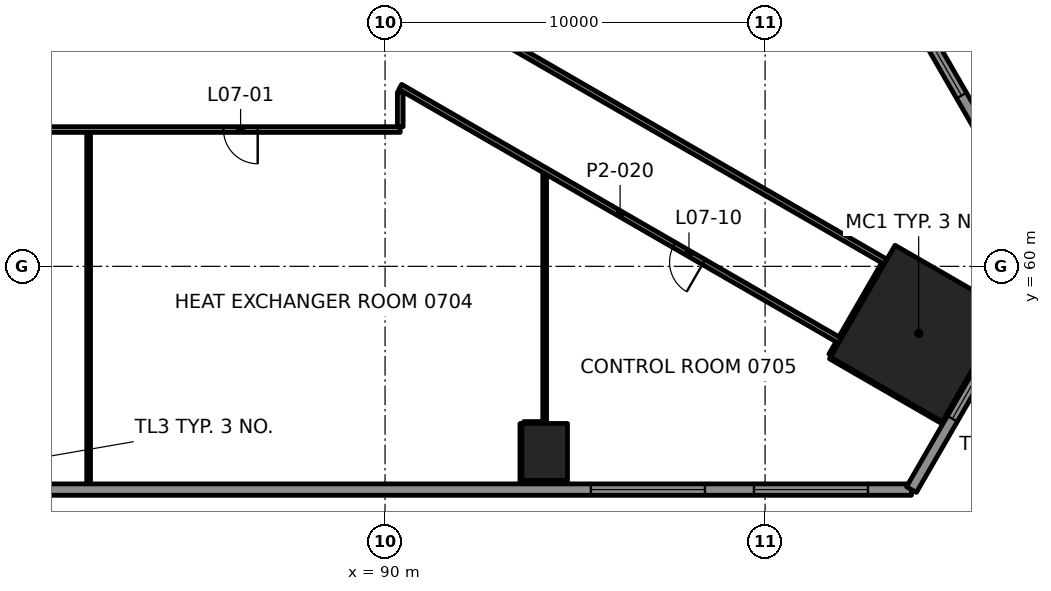
"""IFC4 building model, lengths in metres.
Left out: names, types, materials, properties, quantities, classifications, styles, units other than length and angle.
Written with IfcOpenShell. Run it as: python <this file> out.ifc"""

import sys

from ifc_helpers import new_model, si_unit, direction, frame, frame_2d, origin, origin_2d, place, context, subcontext, project, spatial, rectangle, extrude, element, fill, save


model = new_model("IFC4")
c1 = context("Model", 3, precision=1e-05, world=origin(), true_north=direction((0.0, 1.0)))
c2 = subcontext(c1, "Body", "Model", "MODEL_VIEW")
j1 = project(units=[si_unit("LENGTHUNIT", "METRE"), si_unit("PLANEANGLEUNIT", "RADIAN")], contexts=[c1])
p1 = place(None, origin())
s1 = spatial("IfcSite", under=j1, at=p1, CompositionType="ELEMENT")
p2 = place(p1, origin())
s2 = spatial("IfcBuilding", under=s1, at=p2, CompositionType="ELEMENT")
p3 = place(p2, frame((0.0, 0.0, 35.5)))
s3 = spatial("IfcBuildingStorey", under=s2, at=p3, CompositionType="ELEMENT", Elevation=35.5)
p4 = place(p3, frame((104.041, 58.233, 0.0), z_axis=(0.0, 0.0, 1.0), x_axis=(0.5, 0.866025403784, 0.0)))
e1 = element("IfcColumn", 1, at=p4, inside=s3, PredefinedType="COLUMN", context=c2, shape_type="SweptSolid", body=[
    extrude(rectangle(XDim=3.4, YDim=3.4, at=origin_2d()), origin(), (0.0, 0.0, 1.0), 4.5),
])
p5 = place(p3, frame((94.2, 55.115, -0.0), z_axis=(0.0, 0.0, 1.0), x_axis=(1.0, 0.0, 0.0)))
e2 = element("IfcColumn", 2, at=p5, inside=s3, PredefinedType="COLUMN", context=c2, shape_type="SweptSolid", body=[
    extrude(rectangle(XDim=1.2, YDim=1.5, at=origin_2d()), origin(), (0.0, 0.0, 1.0), 4.5),
])
p6 = place(p3, frame((93.65, 55.865, 0.0), z_axis=(0.0, 0.0, 1.0), x_axis=(1.0, 0.0, 0.0)))
e3 = element("IfcWall", 3, at=p6, inside=s3, PredefinedType="PARTITIONING", context=c2, shape_type="SweptSolid", body=[
    extrude(rectangle(XDim=0.499, YDim=0.1, at=frame_2d((0.25, 0.0))), origin(), (0.0, 0.0, 1.0), 3.7),
])
p7 = place(p3, frame((90.4, 63.6, 0.0), z_axis=(0.0, 0.0, 1.0), x_axis=(-1.0, 0.0, 0.0)))
e4 = element("IfcWall", 4, at=p7, inside=s3, PredefinedType="PARTITIONING", context=c2, shape_type="SweptSolid", body=[
    extrude(rectangle(XDim=30.799, YDim=0.15, at=frame_2d((15.4, 0.0))), origin(), (0.0, 0.0, 1.0), 3.7),
])
p8 = place(p7, frame((3.751, 0.0, 0.0)))
e5 = element("IfcOpeningElement", 5, at=p8, cuts=e4, PredefinedType="OPENING", context=c2, shape_type="SweptSolid", body=[
    extrude(rectangle(XDim=0.9, YDim=2.1, at=frame_2d((0.45, 1.05))), frame((0.0, 0.085, 0.0), z_axis=(0.0, -1.0, 0.0), x_axis=(1.0, 0.0, 0.0)), (0.0, 0.0, 1.0), 0.17),
])
p9 = place(p7, frame((14.8, 0.0, 0.0)))
e6 = element("IfcOpeningElement", 6, at=p9, cuts=e4, PredefinedType="OPENING", context=c2, shape_type="SweptSolid", body=[
    extrude(rectangle(XDim=1.2, YDim=2.1, at=frame_2d((0.6, 1.05))), frame((0.0, 0.085, 0.0), z_axis=(0.0, -1.0, 0.0), x_axis=(1.0, 0.0, 0.0)), (0.0, 0.0, 1.0), 0.17),
])
p10 = place(p7, frame((25.998, 0.0, 0.0)))
e7 = element("IfcOpeningElement", 7, at=p10, cuts=e4, PredefinedType="OPENING", context=c2, shape_type="SweptSolid", body=[
    extrude(rectangle(XDim=1.2, YDim=2.1, at=frame_2d((0.6, 1.05))), frame((0.0, 0.085, 0.0), z_axis=(0.0, -1.0, 0.0), x_axis=(1.0, 0.0, 0.0)), (0.0, 0.0, 1.0), 0.17),
])
p11 = place(p3, frame((101.744, 57.655, 0.0), z_axis=(0.0, 0.0, 1.0), x_axis=(0.500136362069, 0.865946660792, 0.0)))
e8 = element("IfcWall", 8, at=p11, inside=s3, PredefinedType="PARTITIONING", context=c2, shape_type="SweptSolid", body=[
    extrude(rectangle(XDim=0.375, YDim=0.15, at=frame_2d((0.187, 0.0))), origin(), (0.0, 0.0, 1.0), 3.7),
])
p12 = place(p3, frame((94.2, 55.866, 0.0), z_axis=(0.0, 0.0, 1.0), x_axis=(0.0, 1.0, 0.0)))
e9 = element("IfcWall", 9, at=p12, inside=s3, PredefinedType="PARTITIONING", context=c2, shape_type="SweptSolid", body=[
    extrude(rectangle(XDim=6.547, YDim=0.1, at=frame_2d((3.273, 0.0))), origin(), (0.0, 0.0, 1.0), 3.7),
])
p13 = place(p3, frame((93.6, 54.155, 0.0), z_axis=(0.0, 0.0, 1.0), x_axis=(0.0, 1.0, 0.0)))
e10 = element("IfcWall", 10, at=p13, inside=s3, PredefinedType="PARTITIONING", context=c2, shape_type="SweptSolid", body=[
    extrude(rectangle(XDim=1.71, YDim=0.1, at=frame_2d((0.855, 0.0))), origin(), (0.0, 0.0, 1.0), 3.7),
])
p14 = place(p3, frame((90.4, 63.675, 0.0), z_axis=(0.0, 0.0, 1.0), x_axis=(0.0, 1.0, 0.0)))
e11 = element("IfcWall", 11, at=p14, inside=s3, PredefinedType="PARTITIONING", context=c2, shape_type="SweptSolid", body=[
    extrude(rectangle(XDim=0.912, YDim=0.15, at=frame_2d((0.456, 0.0))), origin(), (0.0, 0.0, 1.0), 3.7),
])
p15 = place(p3, frame((82.2, 54.155, 0.0), z_axis=(0.0, 0.0, 1.0), x_axis=(0.0, 1.0, 0.0)))
e12 = element("IfcWall", 12, at=p15, inside=s3, PredefinedType="PARTITIONING", context=c2, shape_type="SweptSolid", body=[
    extrude(rectangle(XDim=9.37, YDim=0.1, at=frame_2d((4.685, 0.0))), origin(), (0.0, 0.0, 1.0), 3.7),
])
p16 = place(p3, frame((103.168, 60.123, 0.0), z_axis=(0.0, 0.0, 1.0), x_axis=(-0.866022484069, 0.500005057062, 0.0)))
e13 = element("IfcWall", 13, at=p16, inside=s3, PredefinedType="PARTITIONING", context=c2, shape_type="SweptSolid", body=[
    extrude(rectangle(XDim=14.657, YDim=0.15, at=frame_2d((7.329, 0.0))), origin(), (0.0, 0.0, 1.0), 3.7),
])
p17 = place(p3, frame((101.969, 58.044, 0.0), z_axis=(0.0, 0.0, 1.0), x_axis=(-0.866027935033, 0.499995615723, 0.0)))
e14 = element("IfcWall", 14, at=p17, inside=s3, PredefinedType="PARTITIONING", context=c2, shape_type="SweptSolid", body=[
    extrude(rectangle(XDim=13.358, YDim=0.15, at=frame_2d((6.679, 0.0))), origin(), (0.0, 0.0, 1.0), 3.547),
])
p18 = place(p17, frame((4.137, 0.0, 0.0)))
e15 = element("IfcOpeningElement", 15, at=p18, cuts=e14, PredefinedType="OPENING", context=c2, shape_type="SweptSolid", body=[
    extrude(rectangle(XDim=0.9, YDim=2.1, at=frame_2d((0.45, 1.05))), frame((0.0, 0.085, 0.0), z_axis=(0.0, -1.0, 0.0), x_axis=(1.0, 0.0, 0.0)), (0.0, 0.0, 1.0), 0.17),
])
p19 = place(p3, frame((104.802, 55.831, 0.0), z_axis=(0.0, 0.0, 1.0), x_axis=(-0.866014251095, 0.500019316528, 0.0)))
e16 = element("IfcWall", 16, at=p19, inside=s3, PredefinedType="PARTITIONING", context=c2, shape_type="SweptSolid", body=[
    extrude(rectangle(XDim=3.559, YDim=0.1, at=frame_2d((1.78, 0.0))), origin(), (0.0, 0.0, 1.0), 3.7),
])
p20 = place(p3, frame((102.007, 58.109, 0.0), z_axis=(0.0, 0.0, 1.0), x_axis=(0.499979232204, 0.866037393745, 0.0)))
e17 = element("IfcWall", 17, at=p20, inside=s3, PredefinedType="PARTITIONING", context=c2, shape_type="SweptSolid", body=[
    extrude(rectangle(XDim=2.25, YDim=0.15, at=frame_2d((1.125, 0.0))), origin(), (0.0, 0.0, 1.0), 3.547),
])
p21 = place(p3, frame((46.148, 54.125, 0.0), z_axis=(0.0, 0.0, 1.0), x_axis=(1.0, 0.0, 0.0)))
e18 = element("IfcWall", 18, at=p21, inside=s3, PredefinedType="SOLIDWALL", context=c2, shape_type="SweptSolid", body=[
    extrude(rectangle(XDim=57.704, YDim=0.3, at=frame_2d((28.852, 0.0))), origin(), (0.0, 0.0, 1.0), 4.3),
])
p22 = place(p21, frame((1.145, 0.0, 0.8)))
e19 = element("IfcOpeningElement", 19, at=p22, cuts=e18, PredefinedType="OPENING", context=c2, shape_type="SweptSolid", body=[
    extrude(rectangle(XDim=3.0, YDim=2.4, at=frame_2d((1.5, 1.2))), frame((0.0, 0.16, 0.0), z_axis=(0.0, -1.0, 0.0), x_axis=(1.0, 0.0, 0.0)), (0.0, 0.0, 1.0), 0.32),
])
p23 = place(p21, frame((5.435, 0.0, 0.8)))
e20 = element("IfcOpeningElement", 20, at=p23, cuts=e18, PredefinedType="OPENING", context=c2, shape_type="SweptSolid", body=[
    extrude(rectangle(XDim=3.0, YDim=2.4, at=frame_2d((1.5, 1.2))), frame((0.0, 0.16, 0.0), z_axis=(0.0, -1.0, 0.0), x_axis=(1.0, 0.0, 0.0)), (0.0, 0.0, 1.0), 0.32),
])
p24 = place(p21, frame((49.269, 0.0, 0.8)))
e21 = element("IfcOpeningElement", 21, at=p24, cuts=e18, PredefinedType="OPENING", context=c2, shape_type="SweptSolid", body=[
    extrude(rectangle(XDim=3.0, YDim=2.4, at=frame_2d((1.5, 1.2))), frame((0.0, 0.16, 0.0), z_axis=(0.0, -1.0, 0.0), x_axis=(1.0, 0.0, 0.0)), (0.0, 0.0, 1.0), 0.32),
])
p25 = place(p21, frame((53.559, 0.0, 0.8)))
e22 = element("IfcOpeningElement", 22, at=p25, cuts=e18, PredefinedType="OPENING", context=c2, shape_type="SweptSolid", body=[
    extrude(rectangle(XDim=3.0, YDim=2.4, at=frame_2d((1.5, 1.2))), frame((0.0, 0.16, 0.0), z_axis=(0.0, -1.0, 0.0), x_axis=(1.0, 0.0, 0.0)), (0.0, 0.0, 1.0), 0.32),
])
p26 = place(p3, frame((103.852, 54.125, 0.0), z_axis=(0.0, 0.0, 1.0), x_axis=(0.500000231294, 0.866025270247, 0.0)))
e23 = element("IfcWall", 23, at=p26, inside=s3, PredefinedType="SOLIDWALL", context=c2, shape_type="SweptSolid", body=[
    extrude(rectangle(XDim=7.304, YDim=0.3, at=frame_2d((3.652, 0.0))), origin(), (0.0, 0.0, 1.0), 4.3),
])
p27 = place(p26, frame((2.152, 0.0, 0.8)))
e24 = element("IfcOpeningElement", 24, at=p27, cuts=e23, PredefinedType="OPENING", context=c2, shape_type="SweptSolid", body=[
    extrude(rectangle(XDim=3.0, YDim=2.4, at=frame_2d((1.5, 1.2))), frame((0.0, 0.16, 0.0), z_axis=(0.0, -1.0, 0.0), x_axis=(1.0, 0.0, 0.0)), (0.0, 0.0, 1.0), 0.32),
])
p28 = place(p3, frame((107.504, 60.451, 0.0), z_axis=(0.0, 0.0, 1.0), x_axis=(-0.500000550228, 0.86602508611, 0.0)))
e25 = element("IfcWall", 25, at=p28, inside=s3, PredefinedType="SOLIDWALL", context=c2, shape_type="SweptSolid", body=[
    extrude(rectangle(XDim=57.704, YDim=0.3, at=frame_2d((28.852, 0.0))), origin(), (0.0, 0.0, 1.0), 4.3),
])
p29 = place(p28, frame((0.89, 0.0, 0.8)))
e26 = element("IfcOpeningElement", 26, at=p29, cuts=e25, PredefinedType="OPENING", context=c2, shape_type="SweptSolid", body=[
    extrude(rectangle(XDim=3.0, YDim=2.4, at=frame_2d((1.5, 1.2))), frame((0.0, 0.16, 0.0), z_axis=(0.0, -1.0, 0.0), x_axis=(1.0, 0.0, 0.0)), (0.0, 0.0, 1.0), 0.32),
])
p30 = place(p28, frame((4.67, 0.0, 0.8)))
e27 = element("IfcOpeningElement", 27, at=p30, cuts=e25, PredefinedType="OPENING", context=c2, shape_type="SweptSolid", body=[
    extrude(rectangle(XDim=3.0, YDim=2.4, at=frame_2d((1.5, 1.2))), frame((0.0, 0.16, 0.0), z_axis=(0.0, -1.0, 0.0), x_axis=(1.0, 0.0, 0.0)), (0.0, 0.0, 1.0), 0.32),
])
p31 = place(p28, frame((8.451, 0.0, 0.8)))
e28 = element("IfcOpeningElement", 28, at=p31, cuts=e25, PredefinedType="OPENING", context=c2, shape_type="SweptSolid", body=[
    extrude(rectangle(XDim=3.0, YDim=2.4, at=frame_2d((1.5, 1.2))), frame((0.0, 0.16, 0.0), z_axis=(0.0, -1.0, 0.0), x_axis=(1.0, 0.0, 0.0)), (0.0, 0.0, 1.0), 0.32),
])
p32 = place(p28, frame((12.231, 0.0, 0.8)))
e29 = element("IfcOpeningElement", 29, at=p32, cuts=e25, PredefinedType="OPENING", context=c2, shape_type="SweptSolid", body=[
    extrude(rectangle(XDim=3.0, YDim=2.4, at=frame_2d((1.5, 1.2))), frame((0.0, 0.16, 0.0), z_axis=(0.0, -1.0, 0.0), x_axis=(1.0, 0.0, 0.0)), (0.0, 0.0, 1.0), 0.32),
])
p33 = place(p28, frame((16.011, 0.0, 0.8)))
e30 = element("IfcOpeningElement", 30, at=p33, cuts=e25, PredefinedType="OPENING", context=c2, shape_type="SweptSolid", body=[
    extrude(rectangle(XDim=3.0, YDim=2.4, at=frame_2d((1.5, 1.2))), frame((0.0, 0.16, 0.0), z_axis=(0.0, -1.0, 0.0), x_axis=(1.0, 0.0, 0.0)), (0.0, 0.0, 1.0), 0.32),
])
p34 = place(p28, frame((19.792, 0.0, 0.8)))
e31 = element("IfcOpeningElement", 31, at=p34, cuts=e25, PredefinedType="OPENING", context=c2, shape_type="SweptSolid", body=[
    extrude(rectangle(XDim=3.0, YDim=2.4, at=frame_2d((1.5, 1.2))), frame((0.0, 0.16, 0.0), z_axis=(0.0, -1.0, 0.0), x_axis=(1.0, 0.0, 0.0)), (0.0, 0.0, 1.0), 0.32),
])
p35 = place(p28, frame((23.572, 0.0, 0.8)))
e32 = element("IfcOpeningElement", 32, at=p35, cuts=e25, PredefinedType="OPENING", context=c2, shape_type="SweptSolid", body=[
    extrude(rectangle(XDim=3.0, YDim=2.4, at=frame_2d((1.5, 1.2))), frame((0.0, 0.16, 0.0), z_axis=(0.0, -1.0, 0.0), x_axis=(1.0, 0.0, 0.0)), (0.0, 0.0, 1.0), 0.32),
])
p36 = place(p28, frame((27.352, 0.0, 0.8)))
e33 = element("IfcOpeningElement", 33, at=p36, cuts=e25, PredefinedType="OPENING", context=c2, shape_type="SweptSolid", body=[
    extrude(rectangle(XDim=3.0, YDim=2.4, at=frame_2d((1.5, 1.2))), frame((0.0, 0.16, 0.0), z_axis=(0.0, -1.0, 0.0), x_axis=(1.0, 0.0, 0.0)), (0.0, 0.0, 1.0), 0.32),
])
p37 = place(p28, frame((31.132, 0.0, 0.8)))
e34 = element("IfcOpeningElement", 34, at=p37, cuts=e25, PredefinedType="OPENING", context=c2, shape_type="SweptSolid", body=[
    extrude(rectangle(XDim=3.0, YDim=2.4, at=frame_2d((1.5, 1.2))), frame((0.0, 0.16, 0.0), z_axis=(0.0, -1.0, 0.0), x_axis=(1.0, 0.0, 0.0)), (0.0, 0.0, 1.0), 0.32),
])
p38 = place(p28, frame((34.913, 0.0, 0.8)))
e35 = element("IfcOpeningElement", 35, at=p38, cuts=e25, PredefinedType="OPENING", context=c2, shape_type="SweptSolid", body=[
    extrude(rectangle(XDim=3.0, YDim=2.4, at=frame_2d((1.5, 1.2))), frame((0.0, 0.16, 0.0), z_axis=(0.0, -1.0, 0.0), x_axis=(1.0, 0.0, 0.0)), (0.0, 0.0, 1.0), 0.32),
])
p39 = place(p28, frame((38.693, 0.0, 0.8)))
e36 = element("IfcOpeningElement", 36, at=p39, cuts=e25, PredefinedType="OPENING", context=c2, shape_type="SweptSolid", body=[
    extrude(rectangle(XDim=3.0, YDim=2.4, at=frame_2d((1.5, 1.2))), frame((0.0, 0.16, 0.0), z_axis=(0.0, -1.0, 0.0), x_axis=(1.0, 0.0, 0.0)), (0.0, 0.0, 1.0), 0.32),
])
p40 = place(p28, frame((42.473, 0.0, 0.8)))
e37 = element("IfcOpeningElement", 37, at=p40, cuts=e25, PredefinedType="OPENING", context=c2, shape_type="SweptSolid", body=[
    extrude(rectangle(XDim=3.0, YDim=2.4, at=frame_2d((1.5, 1.2))), frame((0.0, 0.16, 0.0), z_axis=(0.0, -1.0, 0.0), x_axis=(1.0, 0.0, 0.0)), (0.0, 0.0, 1.0), 0.32),
])
p41 = place(p28, frame((46.253, 0.0, 0.8)))
e38 = element("IfcOpeningElement", 38, at=p41, cuts=e25, PredefinedType="OPENING", context=c2, shape_type="SweptSolid", body=[
    extrude(rectangle(XDim=3.0, YDim=2.4, at=frame_2d((1.5, 1.2))), frame((0.0, 0.16, 0.0), z_axis=(0.0, -1.0, 0.0), x_axis=(1.0, 0.0, 0.0)), (0.0, 0.0, 1.0), 0.32),
])
p42 = place(p28, frame((50.033, 0.0, 0.8)))
e39 = element("IfcOpeningElement", 39, at=p42, cuts=e25, PredefinedType="OPENING", context=c2, shape_type="SweptSolid", body=[
    extrude(rectangle(XDim=3.0, YDim=2.4, at=frame_2d((1.5, 1.2))), frame((0.0, 0.16, 0.0), z_axis=(0.0, -1.0, 0.0), x_axis=(1.0, 0.0, 0.0)), (0.0, 0.0, 1.0), 0.32),
])
p43 = place(p28, frame((53.814, 0.0, 0.8)))
e40 = element("IfcOpeningElement", 40, at=p43, cuts=e25, PredefinedType="OPENING", context=c2, shape_type="SweptSolid", body=[
    extrude(rectangle(XDim=3.0, YDim=2.4, at=frame_2d((1.5, 1.2))), frame((0.0, 0.16, 0.0), z_axis=(0.0, -1.0, 0.0), x_axis=(1.0, 0.0, 0.0)), (0.0, 0.0, 1.0), 0.32),
])
p44 = place(p8, origin())
e41 = element("IfcDoor", 41, at=p44, inside=s3, OperationType="SINGLE_SWING_RIGHT", PredefinedType="DOOR", context=c2, shape_type="SweptSolid", body=[
    extrude(rectangle(XDim=0.9, YDim=2.1, at=frame_2d((0.45, 1.05))), frame((0.0, 0.025, 0.0), z_axis=(0.0, -1.0, 0.0), x_axis=(1.0, 0.0, 0.0)), (0.0, 0.0, 1.0), 0.05),
])
fill(e5, e41)
p45 = place(p18, origin())
e42 = element("IfcDoor", 42, at=p45, inside=s3, OperationType="SINGLE_SWING_RIGHT", PredefinedType="DOOR", context=c2, shape_type="SweptSolid", body=[
    extrude(rectangle(XDim=0.9, YDim=2.1, at=frame_2d((0.45, 1.05))), frame((0.0, 0.025, 0.0), z_axis=(0.0, -1.0, 0.0), x_axis=(1.0, 0.0, 0.0)), (0.0, 0.0, 1.0), 0.05),
])
fill(e15, e42)
p46 = place(p24, origin())
e43 = element("IfcWindow", 43, at=p46, inside=s3, PartitioningType="SINGLE_PANEL", PredefinedType="WINDOW", context=c2, shape_type="SweptSolid", body=[
    extrude(rectangle(XDim=3.0, YDim=2.4, at=frame_2d((1.5, 1.2))), frame((0.0, 0.03, 0.0), z_axis=(0.0, -1.0, 0.0), x_axis=(1.0, 0.0, 0.0)), (0.0, 0.0, 1.0), 0.06),
])
fill(e21, e43)
p47 = place(p25, origin())
e44 = element("IfcWindow", 44, at=p47, inside=s3, PartitioningType="SINGLE_PANEL", PredefinedType="WINDOW", context=c2, shape_type="SweptSolid", body=[
    extrude(rectangle(XDim=3.0, YDim=2.4, at=frame_2d((1.5, 1.2))), frame((0.0, 0.03, 0.0), z_axis=(0.0, -1.0, 0.0), x_axis=(1.0, 0.0, 0.0)), (0.0, 0.0, 1.0), 0.06),
])
fill(e22, e44)
p48 = place(p27, origin())
e45 = element("IfcWindow", 45, at=p48, inside=s3, PartitioningType="SINGLE_PANEL", PredefinedType="WINDOW", context=c2, shape_type="SweptSolid", body=[
    extrude(rectangle(XDim=3.0, YDim=2.4, at=frame_2d((1.5, 1.2))), frame((0.0, 0.03, 0.0), z_axis=(0.0, -1.0, 0.0), x_axis=(1.0, 0.0, 0.0)), (0.0, 0.0, 1.0), 0.06),
])
fill(e24, e45)
p49 = place(p30, origin())
e46 = element("IfcWindow", 46, at=p49, inside=s3, PartitioningType="SINGLE_PANEL", PredefinedType="WINDOW", context=c2, shape_type="SweptSolid", body=[
    extrude(rectangle(XDim=3.0, YDim=2.4, at=frame_2d((1.5, 1.2))), frame((0.0, 0.03, 0.0), z_axis=(0.0, -1.0, 0.0), x_axis=(1.0, 0.0, 0.0)), (0.0, 0.0, 1.0), 0.06),
])
fill(e27, e46)
save(model, sys.argv[1])
